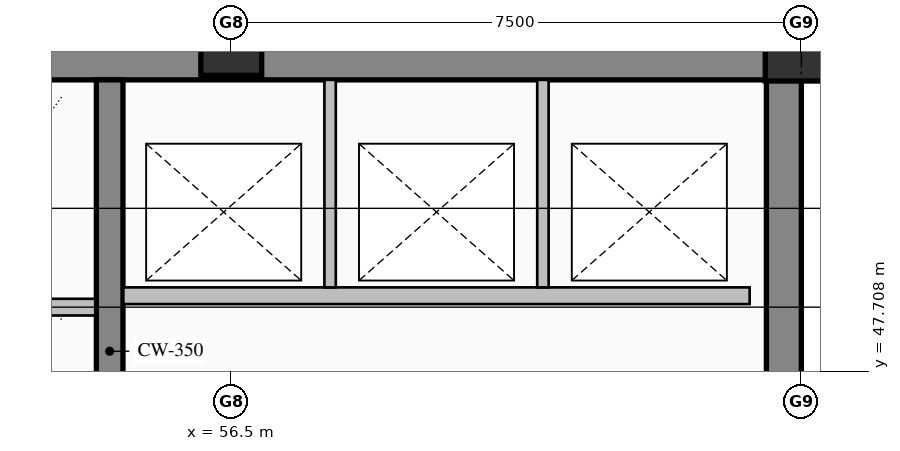
"""IFC4 building model, lengths in metres.
Left out: names, types, materials, properties, quantities, classifications, styles, units other than length and angle.
Written with IfcOpenShell. Run it as: python <this file> out.ifc"""

import sys

from ifc_helpers import new_model, si_unit, direction, frame, frame_2d, origin, origin_2d, place, context, subcontext, project, spatial, rectangle, hollow_rectangle, extrude, element, save


model = new_model("IFC4")
c1 = context("Model", 3, precision=1e-05, world=origin(), true_north=direction((0.0, 1.0)))
c2 = subcontext(c1, "Body", "Model", "MODEL_VIEW")
j1 = project(units=[si_unit("LENGTHUNIT", "METRE"), si_unit("PLANEANGLEUNIT", "RADIAN")], contexts=[c1])
p1 = place(None, origin())
s1 = spatial("IfcSite", under=j1, at=p1, CompositionType="ELEMENT")
p2 = place(p1, origin())
s2 = spatial("IfcBuilding", under=s1, at=p2, CompositionType="ELEMENT")
p3 = place(p2, frame((0.0, 0.0, 249.8)))
s3 = spatial("IfcBuildingStorey", under=s2, at=p3, CompositionType="ELEMENT", Elevation=249.8)
p4 = place(p3, frame((40.5, 51.77, 0.0), z_axis=(0.0, 0.0, 1.0), x_axis=(1.0, 0.0, 0.0)))
e1 = element("IfcWall", 1, at=p4, inside=s3, PredefinedType="SHEAR", context=c2, shape_type="SweptSolid", body=[
    extrude(rectangle(XDim=23.5, YDim=0.46, at=frame_2d((11.75, 0.0))), origin(), (0.0, 0.0, 1.0), 3.775),
])
p5 = place(p3, frame((63.77, 36.32, 0.0), z_axis=(0.0, 0.0, 1.0), x_axis=(0.0, 1.0, 0.0)))
e2 = element("IfcWall", 2, at=p5, inside=s3, PredefinedType="SHEAR", context=c2, shape_type="SweptSolid", body=[
    extrude(rectangle(XDim=15.22, YDim=0.46, at=frame_2d((7.61, 0.0))), origin(), (0.0, 0.0, 1.0), 3.775),
])
p6 = place(p3, frame((54.9, 44.4, 0.0), z_axis=(0.0, 0.0, 1.0), x_axis=(0.0, 1.0, 0.0)))
e3 = element("IfcWall", 3, at=p6, inside=s3, PredefinedType="SHEAR", context=c2, shape_type="SweptSolid", body=[
    extrude(rectangle(XDim=7.14, YDim=0.35, at=frame_2d((3.57, 0.0))), origin(), (0.0, 0.0, 1.0), 3.775),
])
p7 = place(p3, frame((56.5, 52.0, 0.0), z_axis=(0.0, 0.0, 1.0), x_axis=(1.0, 0.0, 0.0)))
e4 = element("IfcColumn", 4, at=p7, inside=s3, PredefinedType="COLUMN", context=c2, shape_type="SweptSolid", body=[
    extrude(hollow_rectangle(XDim=0.8, YDim=0.8, WallThickness=0.032, at=origin_2d()), origin(), (0.0, 0.0, 1.0), 4.0),
])
p8 = place(p3, frame((64.0, 52.0, 0.0), z_axis=(0.0, 0.0, 1.0), x_axis=(1.0, 0.0, 0.0)))
e5 = element("IfcColumn", 5, at=p8, inside=s3, PredefinedType="COLUMN", context=c2, shape_type="SweptSolid", body=[
    extrude(hollow_rectangle(XDim=0.95, YDim=0.95, WallThickness=0.036, at=origin_2d()), origin(), (0.0, 0.0, 1.0), 4.0),
])
p9 = place(p3, frame((54.71, 48.55, 0.0), z_axis=(0.0, 0.0, 1.0), x_axis=(-1.0, 0.0, 0.0)))
e6 = element("IfcWall", 6, at=p9, inside=s3, PredefinedType="PARTITIONING", context=c2, shape_type="SweptSolid", body=[
    extrude(rectangle(XDim=5.12, YDim=0.22, at=frame_2d((2.56, 0.0))), origin(), (0.0, 0.0, 1.0), 3.775),
])
p10 = place(p9, frame((3.735, 0.0, 0.0)))
e7 = element("IfcOpeningElement", 7, at=p10, cuts=e6, PredefinedType="OPENING", context=c2, shape_type="SweptSolid", body=[
    extrude(rectangle(XDim=1.15, YDim=2.2, at=frame_2d((0.575, 1.1))), frame((0.0, 0.12, 0.0), z_axis=(0.0, -1.0, 0.0), x_axis=(1.0, 0.0, 0.0)), (0.0, 0.0, 1.0), 0.24),
])
p11 = place(p9, frame((0.935, 0.0, 0.0)))
e8 = element("IfcOpeningElement", 8, at=p11, cuts=e6, PredefinedType="OPENING", context=c2, shape_type="SweptSolid", body=[
    extrude(rectangle(XDim=1.15, YDim=2.2, at=frame_2d((0.575, 1.1))), frame((0.0, 0.12, 0.0), z_axis=(0.0, -1.0, 0.0), x_axis=(1.0, 0.0, 0.0)), (0.0, 0.0, 1.0), 0.24),
])
p12 = place(p3, frame((63.32, 48.7, 0.0), z_axis=(0.0, 0.0, 1.0), x_axis=(-1.0, 0.0, 0.0)))
e9 = element("IfcWall", 9, at=p12, inside=s3, PredefinedType="PARTITIONING", context=c2, shape_type="SweptSolid", body=[
    extrude(rectangle(XDim=8.24, YDim=0.22, at=frame_2d((4.12, 0.0))), origin(), (0.0, 0.0, 1.0), 3.775),
])
for number, where, z_axis, x_axis in (
    (10, (57.8, 48.81, 0.0), (0.0, 0.0, 1.0), (0.0, 1.0, 0.0)),
    (11, (60.6, 48.81, 0.0), (0.0, 0.0, 1.0), (0.0, 1.0, 0.0)),
):
    element("IfcWall", number, at=place(p3, frame(where, z_axis=z_axis, x_axis=x_axis)), inside=s3, PredefinedType="PARTITIONING", context=c2, shape_type="SweptSolid", body=[
        extrude(rectangle(XDim=2.73, YDim=0.15, at=frame_2d((1.365, 0.0))), origin(), (0.0, 0.0, 1.0), 3.775),
    ])
save(model, sys.argv[1])
